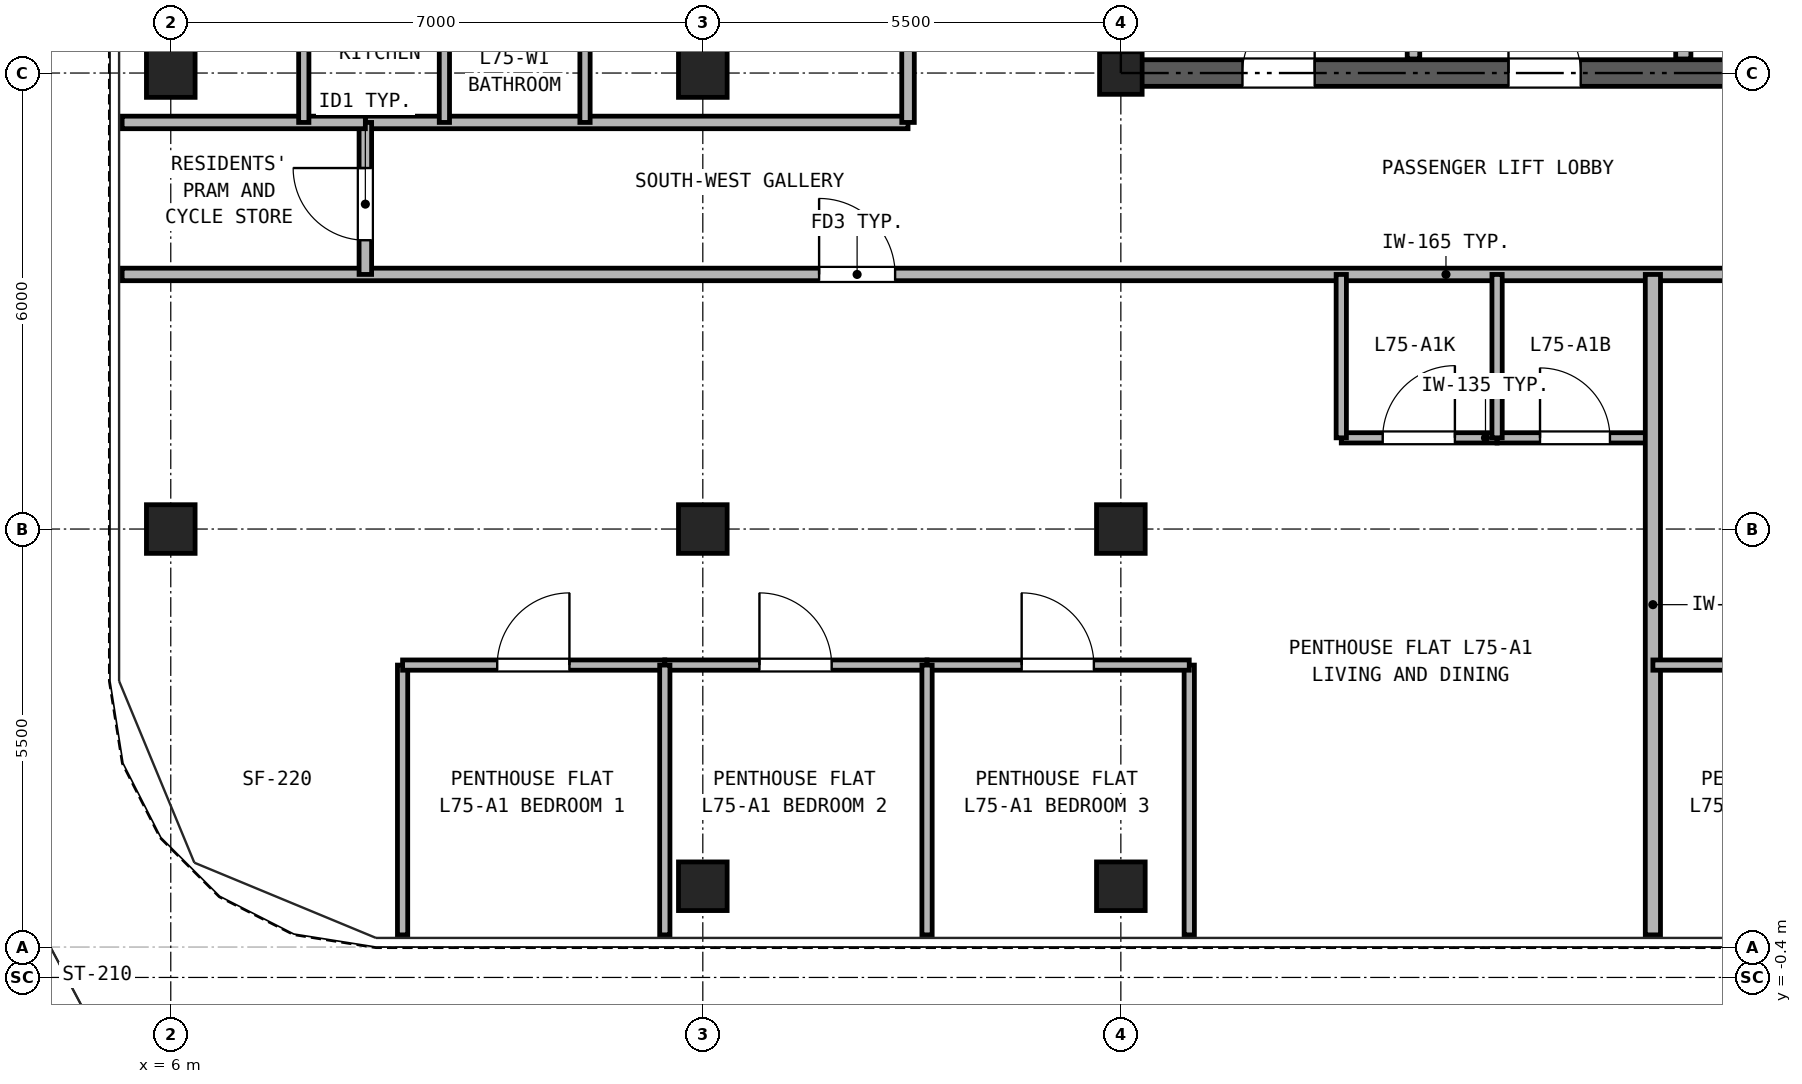
"""IFC4 building model, lengths in metres.
Left out: names, types, materials, properties, quantities, classifications, styles, units other than length and angle.
Written with IfcOpenShell. Run it as: python <this file> out.ifc"""

import sys

from ifc_helpers import new_model, si_unit, direction, frame, frame_2d, origin, origin_2d, place, context, subcontext, project, spatial, rectangle, hollow_rectangle, extrude, source, transform, mapped, element, fill, save


model = new_model("IFC4")
c1 = context("Model", 3, precision=1e-05, world=origin(), true_north=direction((0.0, 1.0)))
c2 = subcontext(c1, "Body", "Model", "MODEL_VIEW")
j1 = project(units=[si_unit("LENGTHUNIT", "METRE"), si_unit("PLANEANGLEUNIT", "RADIAN")], contexts=[c1])
p1 = place(None, origin())
s1 = spatial("IfcSite", under=j1, at=p1, CompositionType="ELEMENT")
p2 = place(p1, origin())
s2 = spatial("IfcBuilding", under=s1, at=p2, CompositionType="ELEMENT")
p3 = place(p2, frame((0.0, 0.0, 261.7)))
s3 = spatial("IfcBuildingStorey", under=s2, at=p3, CompositionType="ELEMENT", Elevation=261.7)
m1 = source(origin(), c2, "Body", "SweptSolid", [
    extrude(hollow_rectangle(XDim=0.64, YDim=0.64, WallThickness=0.035, at=origin_2d()), origin(), (0.0, 0.0, 1.0), 2.98),
])
for number, where, z_axis, x_axis in (
    (1, (13.0, 0.8, 0.0), (0.0, 0.0, 1.0), (1.0, 0.0, 0.0)),
    (2, (18.5, 0.8, 0.0), (0.0, 0.0, 1.0), (1.0, 0.0, 0.0)),
    (3, (6.0, 5.5, 0.0), (0.0, 0.0, 1.0), (1.0, 0.0, 0.0)),
    (4, (6.0, 11.5, 0.0), (0.0, 0.0, 1.0), (1.0, 0.0, 0.0)),
    (5, (13.0, 5.5, 0.0), (0.0, 0.0, 1.0), (1.0, 0.0, 0.0)),
    (6, (13.0, 11.5, 0.0), (0.0, 0.0, 1.0), (1.0, 0.0, 0.0)),
    (7, (18.5, 5.5, 0.0), (0.0, 0.0, 1.0), (1.0, 0.0, 0.0)),
):
    element("IfcColumn", number, at=place(p3, frame(where, z_axis=z_axis, x_axis=x_axis)), inside=s3, PredefinedType="COLUMN", context=c2, shape_type="MappedRepresentation", body=[
        mapped(m1, transform((0.0, 0.0, 0.0), x_axis=(1.0, 0.0, 0.0), y_axis=(0.0, 1.0, 0.0), z_axis=(0.0, 0.0, 1.0), scale=1.0)),
    ])
m2 = source(origin(), c2, "Body", "SweptSolid", [
    extrude(hollow_rectangle(XDim=0.56, YDim=0.56, WallThickness=0.03, at=origin_2d()), origin(), (0.0, 0.0, 1.0), 2.98),
])
p4 = place(p3, frame((18.5, 11.5, 0.0), z_axis=(0.0, 0.0, 1.0), x_axis=(1.0, 0.0, 0.0)))
e8 = element("IfcColumn", 8, at=p4, inside=s3, PredefinedType="COLUMN", context=c2, shape_type="MappedRepresentation", body=[
    mapped(m2, transform((0.0, 0.0, 0.0), x_axis=(1.0, 0.0, 0.0), y_axis=(0.0, 1.0, 0.0), z_axis=(0.0, 0.0, 1.0), scale=1.0)),
])
p5 = place(p3, frame((18.325, 11.5, 0.0), z_axis=(0.0, 0.0, 1.0), x_axis=(1.0, 0.0, 0.0)))
e9 = element("IfcWall", 9, at=p5, inside=s3, PredefinedType="SHEAR", context=c2, shape_type="SweptSolid", body=[
    extrude(rectangle(XDim=10.35, YDim=0.35, at=frame_2d((5.175, 0.0))), origin(), (0.0, 0.0, 1.0), 2.98),
])
p6 = place(p5, frame((1.775, 0.0, 0.0)))
e10 = element("IfcOpeningElement", 10, at=p6, cuts=e9, PredefinedType="OPENING", context=c2, shape_type="SweptSolid", body=[
    extrude(rectangle(XDim=0.95, YDim=2.15, at=frame_2d((0.475, 1.075))), frame((0.0, 0.185, 0.0), z_axis=(0.0, -1.0, 0.0), x_axis=(1.0, 0.0, 0.0)), (0.0, 0.0, 1.0), 0.37),
])
p7 = place(p5, frame((5.275, 0.0, 0.0)))
e11 = element("IfcOpeningElement", 11, at=p7, cuts=e9, PredefinedType="OPENING", context=c2, shape_type="SweptSolid", body=[
    extrude(rectangle(XDim=0.95, YDim=2.15, at=frame_2d((0.475, 1.075))), frame((0.0, 0.185, 0.0), z_axis=(0.0, -1.0, 0.0), x_axis=(1.0, 0.0, 0.0)), (0.0, 0.0, 1.0), 0.37),
])
p8 = place(p5, frame((8.175, 0.0, 0.0)))
e12 = element("IfcOpeningElement", 12, at=p8, cuts=e9, PredefinedType="OPENING", context=c2, shape_type="SweptSolid", body=[
    extrude(rectangle(XDim=1.1, YDim=2.25, at=frame_2d((0.55, 1.125))), frame((0.0, 0.185, 0.0), z_axis=(0.0, -1.0, 0.0), x_axis=(1.0, 0.0, 0.0)), (0.0, 0.0, 1.0), 0.37),
])
p9 = place(p3, frame((18.5, 11.675, 0.0), z_axis=(0.0, 0.0, 1.0), x_axis=(0.0, 1.0, 0.0)))
e13 = element("IfcWall", 13, at=p9, inside=s3, PredefinedType="SHEAR", context=c2, shape_type="SweptSolid", body=[
    extrude(rectangle(XDim=16.9, YDim=0.35, at=frame_2d((8.45, 0.0))), origin(), (0.0, 0.0, 1.0), 2.98),
])
p10 = place(p9, frame((7.475, 0.0, 0.0)))
e14 = element("IfcOpeningElement", 14, at=p10, cuts=e13, PredefinedType="OPENING", context=c2, shape_type="SweptSolid", body=[
    extrude(rectangle(XDim=1.15, YDim=2.2, at=frame_2d((0.575, 1.1))), frame((0.0, 0.185, 0.0), z_axis=(0.0, -1.0, 0.0), x_axis=(1.0, 0.0, 0.0)), (0.0, 0.0, 1.0), 0.37),
])
p11 = place(p3, frame((22.35, 11.685, 0.0), z_axis=(0.0, 0.0, 1.0), x_axis=(0.0, 1.0, 0.0)))
e15 = element("IfcWall", 15, at=p11, inside=s3, PredefinedType="PARTITIONING", context=c2, shape_type="SweptSolid", body=[
    extrude(rectangle(XDim=3.315, YDim=0.165, at=frame_2d((1.657, 0.0))), origin(), (0.0, 0.0, 1.0), 2.98),
])
p12 = place(p3, frame((25.9, 11.685, 0.0), z_axis=(0.0, 0.0, 1.0), x_axis=(0.0, 1.0, 0.0)))
e16 = element("IfcWall", 16, at=p12, inside=s3, PredefinedType="PARTITIONING", context=c2, shape_type="SweptSolid", body=[
    extrude(rectangle(XDim=3.315, YDim=0.2, at=frame_2d((1.657, 0.0))), origin(), (0.0, 0.0, 1.0), 2.98),
])
p13 = place(p3, frame((5.36, 8.85, 0.0), z_axis=(0.0, 0.0, 1.0), x_axis=(1.0, 0.0, 0.0)))
e17 = element("IfcWall", 17, at=p13, inside=s3, PredefinedType="PARTITIONING", context=c2, shape_type="SweptSolid", body=[
    extrude(rectangle(XDim=36.28, YDim=0.165, at=frame_2d((18.14, 0.0))), origin(), (0.0, 0.0, 1.0), 2.98),
])
p14 = place(p13, frame((9.17, 0.0, 0.0)))
e18 = element("IfcOpeningElement", 18, at=p14, cuts=e17, PredefinedType="OPENING", context=c2, shape_type="SweptSolid", body=[
    extrude(rectangle(XDim=1.0, YDim=2.15, at=frame_2d((0.5, 1.075))), frame((0.0, 0.093, 0.0), z_axis=(0.0, -1.0, 0.0), x_axis=(1.0, 0.0, 0.0)), (0.0, 0.0, 1.0), 0.185),
])
p15 = place(p13, frame((24.665, 0.0, 0.0)))
e19 = element("IfcOpeningElement", 19, at=p15, cuts=e17, PredefinedType="OPENING", context=c2, shape_type="SweptSolid", body=[
    extrude(rectangle(XDim=1.0, YDim=2.15, at=frame_2d((0.5, 1.075))), frame((0.0, 0.093, 0.0), z_axis=(0.0, -1.0, 0.0), x_axis=(1.0, 0.0, 0.0)), (0.0, 0.0, 1.0), 0.185),
])
p16 = place(p3, frame((8.56, 10.85, 0.0), z_axis=(0.0, 0.0, 1.0), x_axis=(1.0, 0.0, 0.0)))
e20 = element("IfcWall", 20, at=p16, inside=s3, PredefinedType="PARTITIONING", context=c2, shape_type="SweptSolid", body=[
    extrude(rectangle(XDim=7.14, YDim=0.165, at=frame_2d((3.57, 0.0))), origin(), (0.0, 0.0, 1.0), 2.98),
])
p17 = place(p3, frame((8.56, 8.85, 0.0), z_axis=(0.0, 0.0, 1.0), x_axis=(0.0, 1.0, 0.0)))
e21 = element("IfcWall", 21, at=p17, inside=s3, PredefinedType="PARTITIONING", context=c2, shape_type="SweptSolid", body=[
    extrude(rectangle(XDim=2.0, YDim=0.165, at=frame_2d((1.0, 0.0))), origin(), (0.0, 0.0, 1.0), 2.98),
])
p18 = place(p17, frame((0.45, 0.0, 0.0)))
e22 = element("IfcOpeningElement", 22, at=p18, cuts=e21, PredefinedType="OPENING", context=c2, shape_type="SweptSolid", body=[
    extrude(rectangle(XDim=0.95, YDim=2.15, at=frame_2d((0.475, 1.075))), frame((0.0, 0.093, 0.0), z_axis=(0.0, -1.0, 0.0), x_axis=(1.0, 0.0, 0.0)), (0.0, 0.0, 1.0), 0.185),
])
p19 = place(p3, frame((15.7, 10.85, 0.0), z_axis=(0.0, 0.0, 1.0), x_axis=(0.0, 1.0, 0.0)))
e23 = element("IfcWall", 23, at=p19, inside=s3, PredefinedType="PARTITIONING", context=c2, shape_type="SweptSolid", body=[
    extrude(rectangle(XDim=24.29, YDim=0.165, at=frame_2d((12.145, 0.0))), origin(), (0.0, 0.0, 1.0), 2.98),
])
p20 = place(p19, frame((3.475, 0.0, 0.0)))
e24 = element("IfcOpeningElement", 24, at=p20, cuts=e23, PredefinedType="OPENING", context=c2, shape_type="SweptSolid", body=[
    extrude(rectangle(XDim=1.0, YDim=2.15, at=frame_2d((0.5, 1.075))), frame((0.0, 0.093, 0.0), z_axis=(0.0, -1.0, 0.0), x_axis=(1.0, 0.0, 0.0)), (0.0, 0.0, 1.0), 0.185),
])
p21 = place(p19, frame((11.55, 0.0, 0.0)))
e25 = element("IfcOpeningElement", 25, at=p21, cuts=e23, PredefinedType="OPENING", context=c2, shape_type="SweptSolid", body=[
    extrude(rectangle(XDim=1.0, YDim=2.15, at=frame_2d((0.5, 1.075))), frame((0.0, 0.093, 0.0), z_axis=(0.0, -1.0, 0.0), x_axis=(1.0, 0.0, 0.0)), (0.0, 0.0, 1.0), 0.185),
])
p22 = place(p19, frame((17.55, 0.0, 0.0)))
e26 = element("IfcOpeningElement", 26, at=p22, cuts=e23, PredefinedType="OPENING", context=c2, shape_type="SweptSolid", body=[
    extrude(rectangle(XDim=1.0, YDim=2.15, at=frame_2d((0.5, 1.075))), frame((0.0, 0.093, 0.0), z_axis=(0.0, -1.0, 0.0), x_axis=(1.0, 0.0, 0.0)), (0.0, 0.0, 1.0), 0.185),
])
p23 = place(p3, frame((21.4, 6.7, 0.0), z_axis=(0.0, 0.0, 1.0), x_axis=(1.0, 0.0, 0.0)))
e27 = element("IfcWall", 27, at=p23, inside=s3, PredefinedType="PARTITIONING", context=c2, shape_type="SweptSolid", body=[
    extrude(rectangle(XDim=2.05, YDim=0.135, at=frame_2d((1.025, 0.0))), origin(), (0.0, 0.0, 1.0), 2.98),
])
p24 = place(p23, frame((0.545, 0.0, 0.0)))
e28 = element("IfcOpeningElement", 28, at=p24, cuts=e27, PredefinedType="OPENING", context=c2, shape_type="SweptSolid", body=[
    extrude(rectangle(XDim=0.95, YDim=2.15, at=frame_2d((0.475, 1.075))), frame((0.0, 0.077, 0.0), z_axis=(0.0, -1.0, 0.0), x_axis=(1.0, 0.0, 0.0)), (0.0, 0.0, 1.0), 0.155),
])
p25 = place(p3, frame((23.45, 6.7, 0.0), z_axis=(0.0, 0.0, 1.0), x_axis=(1.0, 0.0, 0.0)))
e29 = element("IfcWall", 29, at=p25, inside=s3, PredefinedType="PARTITIONING", context=c2, shape_type="SweptSolid", body=[
    extrude(rectangle(XDim=2.05, YDim=0.135, at=frame_2d((1.025, 0.0))), origin(), (0.0, 0.0, 1.0), 2.98),
])
p26 = place(p25, frame((0.565, 0.0, 0.0)))
e30 = element("IfcOpeningElement", 30, at=p26, cuts=e29, PredefinedType="OPENING", context=c2, shape_type="SweptSolid", body=[
    extrude(rectangle(XDim=0.92, YDim=2.1, at=frame_2d((0.46, 1.05))), frame((0.0, 0.077, 0.0), z_axis=(0.0, -1.0, 0.0), x_axis=(1.0, 0.0, 0.0)), (0.0, 0.0, 1.0), 0.155),
])
for number, where, z_axis, x_axis in (
    (31, (21.4, 6.7, 0.0), (0.0, 0.0, 1.0), (0.0, 1.0, 0.0)),
    (32, (23.45, 6.7, 0.0), (0.0, 0.0, 1.0), (0.0, 1.0, 0.0)),
):
    element("IfcWall", number, at=place(p3, frame(where, z_axis=z_axis, x_axis=x_axis)), inside=s3, PredefinedType="PARTITIONING", context=c2, shape_type="SweptSolid", body=[
        extrude(rectangle(XDim=2.15, YDim=0.135, at=frame_2d((1.075, 0.0))), origin(), (0.0, 0.0, 1.0), 2.98),
    ])
for number, where, z_axis, x_axis in (
    (33, (9.05, 0.16, 0.0), (0.0, 0.0, 1.0), (0.0, 1.0, 0.0)),
    (34, (19.4, 0.16, 0.0), (0.0, 0.0, 1.0), (0.0, 1.0, 0.0)),
):
    element("IfcWall", number, at=place(p3, frame(where, z_axis=z_axis, x_axis=x_axis)), inside=s3, PredefinedType="PARTITIONING", context=c2, shape_type="SweptSolid", body=[
        extrude(rectangle(XDim=3.55, YDim=0.135, at=frame_2d((1.775, 0.0))), origin(), (0.0, 0.0, 1.0), 2.98),
    ])
p27 = place(p3, frame((9.05, 3.71, 0.0), z_axis=(0.0, 0.0, 1.0), x_axis=(1.0, 0.0, 0.0)))
e35 = element("IfcWall", 35, at=p27, inside=s3, PredefinedType="PARTITIONING", context=c2, shape_type="SweptSolid", body=[
    extrude(rectangle(XDim=3.45, YDim=0.135, at=frame_2d((1.725, 0.0))), origin(), (0.0, 0.0, 1.0), 2.98),
])
p28 = place(p27, frame((1.245, 0.0, 0.0)))
e36 = element("IfcOpeningElement", 36, at=p28, cuts=e35, PredefinedType="OPENING", context=c2, shape_type="SweptSolid", body=[
    extrude(rectangle(XDim=0.95, YDim=2.15, at=frame_2d((0.475, 1.075))), frame((0.0, 0.077, 0.0), z_axis=(0.0, -1.0, 0.0), x_axis=(1.0, 0.0, 0.0)), (0.0, 0.0, 1.0), 0.155),
])
p29 = place(p3, frame((12.5, 3.71, 0.0), z_axis=(0.0, 0.0, 1.0), x_axis=(1.0, 0.0, 0.0)))
e37 = element("IfcWall", 37, at=p29, inside=s3, PredefinedType="PARTITIONING", context=c2, shape_type="SweptSolid", body=[
    extrude(rectangle(XDim=3.45, YDim=0.135, at=frame_2d((1.725, 0.0))), origin(), (0.0, 0.0, 1.0), 2.98),
])
p30 = place(p29, frame((1.245, 0.0, 0.0)))
e38 = element("IfcOpeningElement", 38, at=p30, cuts=e37, PredefinedType="OPENING", context=c2, shape_type="SweptSolid", body=[
    extrude(rectangle(XDim=0.95, YDim=2.15, at=frame_2d((0.475, 1.075))), frame((0.0, 0.077, 0.0), z_axis=(0.0, -1.0, 0.0), x_axis=(1.0, 0.0, 0.0)), (0.0, 0.0, 1.0), 0.155),
])
p31 = place(p3, frame((12.5, 0.16, 0.0), z_axis=(0.0, 0.0, 1.0), x_axis=(0.0, 1.0, 0.0)))
e39 = element("IfcWall", 39, at=p31, inside=s3, PredefinedType="PARTITIONING", context=c2, shape_type="SweptSolid", body=[
    extrude(rectangle(XDim=3.55, YDim=0.135, at=frame_2d((1.775, 0.0))), origin(), (0.0, 0.0, 1.0), 2.98),
])
p32 = place(p3, frame((15.95, 3.71, 0.0), z_axis=(0.0, 0.0, 1.0), x_axis=(1.0, 0.0, 0.0)))
e40 = element("IfcWall", 40, at=p32, inside=s3, PredefinedType="PARTITIONING", context=c2, shape_type="SweptSolid", body=[
    extrude(rectangle(XDim=3.45, YDim=0.135, at=frame_2d((1.725, 0.0))), origin(), (0.0, 0.0, 1.0), 2.98),
])
p33 = place(p32, frame((1.245, 0.0, 0.0)))
e41 = element("IfcOpeningElement", 41, at=p33, cuts=e40, PredefinedType="OPENING", context=c2, shape_type="SweptSolid", body=[
    extrude(rectangle(XDim=0.95, YDim=2.15, at=frame_2d((0.475, 1.075))), frame((0.0, 0.077, 0.0), z_axis=(0.0, -1.0, 0.0), x_axis=(1.0, 0.0, 0.0)), (0.0, 0.0, 1.0), 0.155),
])
p34 = place(p3, frame((15.95, 0.16, 0.0), z_axis=(0.0, 0.0, 1.0), x_axis=(0.0, 1.0, 0.0)))
e42 = element("IfcWall", 42, at=p34, inside=s3, PredefinedType="PARTITIONING", context=c2, shape_type="SweptSolid", body=[
    extrude(rectangle(XDim=3.55, YDim=0.135, at=frame_2d((1.775, 0.0))), origin(), (0.0, 0.0, 1.0), 2.98),
])
p35 = place(p3, frame((25.5, 0.16, 0.0), z_axis=(0.0, 0.0, 1.0), x_axis=(0.0, 1.0, 0.0)))
e43 = element("IfcWall", 43, at=p35, inside=s3, PredefinedType="PARTITIONING", context=c2, shape_type="SweptSolid", body=[
    extrude(rectangle(XDim=8.69, YDim=0.2, at=frame_2d((4.345, 0.0))), origin(), (0.0, 0.0, 1.0), 2.98),
])
p36 = place(p3, frame((25.5, 3.71, 0.0), z_axis=(0.0, 0.0, 1.0), x_axis=(1.0, 0.0, 0.0)))
e44 = element("IfcWall", 44, at=p36, inside=s3, PredefinedType="PARTITIONING", context=c2, shape_type="SweptSolid", body=[
    extrude(rectangle(XDim=3.45, YDim=0.135, at=frame_2d((1.725, 0.0))), origin(), (0.0, 0.0, 1.0), 2.98),
])
p37 = place(p36, frame((1.245, 0.0, 0.0)))
e45 = element("IfcOpeningElement", 45, at=p37, cuts=e44, PredefinedType="OPENING", context=c2, shape_type="SweptSolid", body=[
    extrude(rectangle(XDim=0.95, YDim=2.15, at=frame_2d((0.475, 1.075))), frame((0.0, 0.077, 0.0), z_axis=(0.0, -1.0, 0.0), x_axis=(1.0, 0.0, 0.0)), (0.0, 0.0, 1.0), 0.155),
])
p38 = place(p3, frame((5.36, 10.85, 0.0), z_axis=(0.0, 0.0, 1.0), x_axis=(1.0, 0.0, 0.0)))
e46 = element("IfcWall", 46, at=p38, inside=s3, PredefinedType="PARTITIONING", context=c2, shape_type="SweptSolid", body=[
    extrude(rectangle(XDim=3.2, YDim=0.165, at=frame_2d((1.6, 0.0))), origin(), (0.0, 0.0, 1.0), 2.98),
])
for number, where, z_axis, x_axis in (
    (47, (7.75, 10.85, 0.0), (0.0, 0.0, 1.0), (0.0, 1.0, 0.0)),
    (48, (9.6, 10.85, 0.0), (0.0, 0.0, 1.0), (0.0, 1.0, 0.0)),
    (49, (11.45, 10.85, 0.0), (0.0, 0.0, 1.0), (0.0, 1.0, 0.0)),
):
    element("IfcWall", number, at=place(p3, frame(where, z_axis=z_axis, x_axis=x_axis)), inside=s3, PredefinedType="PARTITIONING", context=c2, shape_type="SweptSolid", body=[
        extrude(rectangle(XDim=2.15, YDim=0.135, at=frame_2d((1.075, 0.0))), origin(), (0.0, 0.0, 1.0), 2.98),
    ])
p39 = place(p6, frame((0.95, 0.0, 0.0), z_axis=(0.0, 0.0, 1.0), x_axis=(-1.0, 0.0, 0.0)))
e50 = element("IfcDoor", 50, at=p39, inside=s3, OperationType="SINGLE_SWING_RIGHT", PredefinedType="DOOR", context=c2, shape_type="SweptSolid", body=[
    extrude(rectangle(XDim=0.95, YDim=2.15, at=frame_2d((0.475, 1.075))), frame((0.0, 0.025, 0.0), z_axis=(0.0, -1.0, 0.0), x_axis=(1.0, 0.0, 0.0)), (0.0, 0.0, 1.0), 0.05),
])
fill(e10, e50)
p40 = place(p7, frame((0.95, 0.0, 0.0), z_axis=(0.0, 0.0, 1.0), x_axis=(-1.0, 0.0, 0.0)))
e51 = element("IfcDoor", 51, at=p40, inside=s3, OperationType="SINGLE_SWING_LEFT", PredefinedType="DOOR", context=c2, shape_type="SweptSolid", body=[
    extrude(rectangle(XDim=0.95, YDim=2.15, at=frame_2d((0.475, 1.075))), frame((0.0, 0.025, 0.0), z_axis=(0.0, -1.0, 0.0), x_axis=(1.0, 0.0, 0.0)), (0.0, 0.0, 1.0), 0.05),
])
fill(e11, e51)
p41 = place(p24, origin())
e52 = element("IfcDoor", 52, at=p41, inside=s3, OperationType="SINGLE_SWING_RIGHT", PredefinedType="DOOR", context=c2, shape_type="SweptSolid", body=[
    extrude(rectangle(XDim=0.95, YDim=2.15, at=frame_2d((0.475, 1.075))), frame((0.0, 0.025, 0.0), z_axis=(0.0, -1.0, 0.0), x_axis=(1.0, 0.0, 0.0)), (0.0, 0.0, 1.0), 0.05),
])
fill(e28, e52)
p42 = place(p26, origin())
e53 = element("IfcDoor", 53, at=p42, inside=s3, OperationType="SINGLE_SWING_LEFT", PredefinedType="DOOR", context=c2, shape_type="SweptSolid", body=[
    extrude(rectangle(XDim=0.92, YDim=2.1, at=frame_2d((0.46, 1.05))), frame((0.0, 0.025, 0.0), z_axis=(0.0, -1.0, 0.0), x_axis=(1.0, 0.0, 0.0)), (0.0, 0.0, 1.0), 0.05),
])
fill(e30, e53)
p43 = place(p28, frame((0.95, 0.0, 0.0), z_axis=(0.0, 0.0, 1.0), x_axis=(-1.0, 0.0, 0.0)))
e54 = element("IfcDoor", 54, at=p43, inside=s3, OperationType="SINGLE_SWING_RIGHT", PredefinedType="DOOR", context=c2, shape_type="SweptSolid", body=[
    extrude(rectangle(XDim=0.95, YDim=2.15, at=frame_2d((0.475, 1.075))), frame((0.0, 0.025, 0.0), z_axis=(0.0, -1.0, 0.0), x_axis=(1.0, 0.0, 0.0)), (0.0, 0.0, 1.0), 0.05),
])
fill(e36, e54)
p44 = place(p30, frame((0.95, 0.0, 0.0), z_axis=(0.0, 0.0, 1.0), x_axis=(-1.0, 0.0, 0.0)))
e55 = element("IfcDoor", 55, at=p44, inside=s3, OperationType="SINGLE_SWING_LEFT", PredefinedType="DOOR", context=c2, shape_type="SweptSolid", body=[
    extrude(rectangle(XDim=0.95, YDim=2.15, at=frame_2d((0.475, 1.075))), frame((0.0, 0.025, 0.0), z_axis=(0.0, -1.0, 0.0), x_axis=(1.0, 0.0, 0.0)), (0.0, 0.0, 1.0), 0.05),
])
fill(e38, e55)
p45 = place(p33, frame((0.95, 0.0, 0.0), z_axis=(0.0, 0.0, 1.0), x_axis=(-1.0, 0.0, 0.0)))
e56 = element("IfcDoor", 56, at=p45, inside=s3, OperationType="SINGLE_SWING_LEFT", PredefinedType="DOOR", context=c2, shape_type="SweptSolid", body=[
    extrude(rectangle(XDim=0.95, YDim=2.15, at=frame_2d((0.475, 1.075))), frame((0.0, 0.025, 0.0), z_axis=(0.0, -1.0, 0.0), x_axis=(1.0, 0.0, 0.0)), (0.0, 0.0, 1.0), 0.05),
])
fill(e41, e56)
p46 = place(p14, frame((1.0, 0.0, 0.0), z_axis=(0.0, 0.0, 1.0), x_axis=(-1.0, 0.0, 0.0)))
e57 = element("IfcDoor", 57, at=p46, inside=s3, OperationType="SINGLE_SWING_LEFT", PredefinedType="DOOR", context=c2, shape_type="SweptSolid", body=[
    extrude(rectangle(XDim=1.0, YDim=2.15, at=frame_2d((0.5, 1.075))), frame((0.0, 0.025, 0.0), z_axis=(0.0, -1.0, 0.0), x_axis=(1.0, 0.0, 0.0)), (0.0, 0.0, 1.0), 0.05),
])
fill(e18, e57)
p47 = place(p18, frame((0.95, 0.0, 0.0), z_axis=(0.0, 0.0, 1.0), x_axis=(-1.0, 0.0, 0.0)))
e58 = element("IfcDoor", 58, at=p47, inside=s3, OperationType="SINGLE_SWING_RIGHT", PredefinedType="DOOR", context=c2, shape_type="SweptSolid", body=[
    extrude(rectangle(XDim=0.95, YDim=2.15, at=frame_2d((0.475, 1.075))), frame((0.0, 0.025, 0.0), z_axis=(0.0, -1.0, 0.0), x_axis=(1.0, 0.0, 0.0)), (0.0, 0.0, 1.0), 0.05),
])
fill(e22, e58)
save(model, sys.argv[1])
